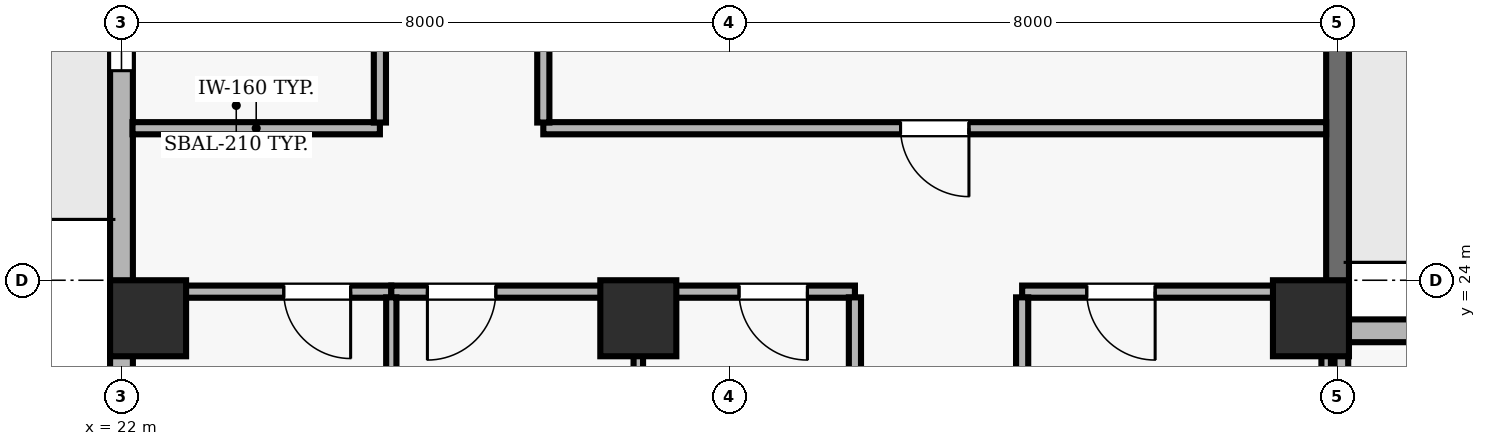
"""IFC4 building model, lengths in metres.
Left out: names, types, materials, properties, quantities, classifications, styles, units other than length and angle.
Written with IfcOpenShell. Run it as: python <this file> out.ifc"""

import sys

from ifc_helpers import new_model, si_unit, direction, frame, frame_2d, origin, origin_2d, place, context, subcontext, project, spatial, rectangle, extrude, element, fill, save


model = new_model("IFC4")
c1 = context("Model", 3, precision=1e-05, world=origin(), true_north=direction((0.0, 1.0)))
c2 = subcontext(c1, "Body", "Model", "MODEL_VIEW")
j1 = project(units=[si_unit("LENGTHUNIT", "METRE"), si_unit("PLANEANGLEUNIT", "RADIAN")], contexts=[c1])
p1 = place(None, origin())
s1 = spatial("IfcSite", under=j1, at=p1, CompositionType="ELEMENT")
p2 = place(p1, origin())
s2 = spatial("IfcBuilding", under=s1, at=p2, CompositionType="ELEMENT")
p3 = place(p2, frame((0.0, 0.0, 203.1)))
s3 = spatial("IfcBuildingStorey", under=s2, at=p3, CompositionType="ELEMENT", Elevation=203.1)
for number, where, z_axis, x_axis in (
    (1, (22.35, 23.5, 0.0), (0.0, 0.0, 1.0), (1.0, 0.0, 0.0)),
    (2, (28.8, 23.5, 0.0), (0.0, 0.0, 1.0), (1.0, 0.0, 0.0)),
    (3, (37.65, 23.5, 0.0), (0.0, 0.0, 1.0), (1.0, 0.0, 0.0)),
):
    element("IfcColumn", number, at=place(p3, frame(where, z_axis=z_axis, x_axis=x_axis)), inside=s3, PredefinedType="COLUMN", context=c2, shape_type="SweptSolid", body=[
        extrude(rectangle(XDim=1.0, YDim=1.0, at=origin_2d()), origin(), (0.0, 0.0, 1.0), 3.9),
    ])
p4 = place(p3, frame((45.9, 23.335, 0.0), z_axis=(0.0, 0.0, 1.0), x_axis=(-1.0, 0.0, 0.0)))
e4 = element("IfcWall", 4, at=p4, inside=s3, PredefinedType="SOLIDWALL", context=c2, shape_type="SweptSolid", body=[
    extrude(rectangle(XDim=7.9, YDim=0.3, at=frame_2d((3.95, 0.0))), origin(), (0.0, 0.0, 1.0), 3.69),
])
p5 = place(p4, frame((2.55, 0.0, 0.9)))
e5 = element("IfcOpeningElement", 5, at=p5, cuts=e4, PredefinedType="OPENING", context=c2, shape_type="SweptSolid", body=[
    extrude(rectangle(XDim=2.8, YDim=1.8, at=frame_2d((1.4, 0.9))), frame((0.0, 0.16, 0.0), z_axis=(0.0, -1.0, 0.0), x_axis=(1.0, 0.0, 0.0)), (0.0, 0.0, 1.0), 0.32),
])
p6 = place(p3, frame((38.0, 23.335, 0.0), z_axis=(0.0, 0.0, 1.0), x_axis=(0.0, 1.0, 0.0)))
e6 = element("IfcWall", 6, at=p6, inside=s3, PredefinedType="SOLIDWALL", context=c2, shape_type="SweptSolid", body=[
    extrude(rectangle(XDim=17.365, YDim=0.3, at=frame_2d((8.683, 0.0))), origin(), (0.0, 0.0, 1.0), 3.69),
])
p7 = place(p6, frame((8.282, 0.0, 0.0)))
e7 = element("IfcOpeningElement", 7, at=p7, cuts=e6, PredefinedType="OPENING", context=c2, shape_type="SweptSolid", body=[
    extrude(rectangle(XDim=1.0, YDim=2.2, at=frame_2d((0.5, 1.1))), frame((0.0, 0.16, 0.0), z_axis=(0.0, -1.0, 0.0), x_axis=(1.0, 0.0, 0.0)), (0.0, 0.0, 1.0), 0.32),
])
p8 = place(p6, frame((13.571, 0.0, 0.9)))
e8 = element("IfcOpeningElement", 8, at=p8, cuts=e6, PredefinedType="OPENING", context=c2, shape_type="SweptSolid", body=[
    extrude(rectangle(XDim=1.8, YDim=2.2, at=frame_2d((0.9, 1.1))), frame((0.0, 0.16, 0.0), z_axis=(0.0, -1.0, 0.0), x_axis=(1.0, 0.0, 0.0)), (0.0, 0.0, 1.0), 0.32),
])
p9 = place(p3, frame((22.0, 40.7, 0.0), z_axis=(0.0, 0.0, 1.0), x_axis=(0.0, -1.0, 0.0)))
e9 = element("IfcWall", 9, at=p9, inside=s3, PredefinedType="SOLIDWALL", context=c2, shape_type="SweptSolid", body=[
    extrude(rectangle(XDim=38.2, YDim=0.3, at=frame_2d((19.1, 0.0))), origin(), (0.0, 0.0, 1.0), 3.69),
])
p10 = place(p9, frame((7.8, 0.0, 0.0)))
e10 = element("IfcOpeningElement", 10, at=p10, cuts=e9, PredefinedType="OPENING", context=c2, shape_type="SweptSolid", body=[
    extrude(rectangle(XDim=1.0, YDim=2.2, at=frame_2d((0.5, 1.1))), frame((0.0, 0.16, 0.0), z_axis=(0.0, -1.0, 0.0), x_axis=(1.0, 0.0, 0.0)), (0.0, 0.0, 1.0), 0.32),
])
p11 = place(p9, frame((1.979, 0.0, 0.9)))
e11 = element("IfcOpeningElement", 11, at=p11, cuts=e9, PredefinedType="OPENING", context=c2, shape_type="SweptSolid", body=[
    extrude(rectangle(XDim=1.5, YDim=1.6, at=frame_2d((0.75, 0.8))), frame((0.0, 0.16, 0.0), z_axis=(0.0, -1.0, 0.0), x_axis=(1.0, 0.0, 0.0)), (0.0, 0.0, 1.0), 0.32),
])
p12 = place(p9, frame((12.443, 0.0, 0.9)))
e12 = element("IfcOpeningElement", 12, at=p12, cuts=e9, PredefinedType="OPENING", context=c2, shape_type="SweptSolid", body=[
    extrude(rectangle(XDim=1.5, YDim=1.6, at=frame_2d((0.75, 0.8))), frame((0.0, 0.16, 0.0), z_axis=(0.0, -1.0, 0.0), x_axis=(1.0, 0.0, 0.0)), (0.0, 0.0, 1.0), 0.32),
])
p13 = place(p9, frame((18.35, 0.0, 0.9)))
e13 = element("IfcOpeningElement", 13, at=p13, cuts=e9, PredefinedType="OPENING", context=c2, shape_type="SweptSolid", body=[
    extrude(rectangle(XDim=1.5, YDim=1.6, at=frame_2d((0.75, 0.8))), frame((0.0, 0.16, 0.0), z_axis=(0.0, -1.0, 0.0), x_axis=(1.0, 0.0, 0.0)), (0.0, 0.0, 1.0), 0.32),
])
p14 = place(p9, frame((23.807, 0.0, 0.9)))
e14 = element("IfcOpeningElement", 14, at=p14, cuts=e9, PredefinedType="OPENING", context=c2, shape_type="SweptSolid", body=[
    extrude(rectangle(XDim=1.5, YDim=1.6, at=frame_2d((0.75, 0.8))), frame((0.0, 0.16, 0.0), z_axis=(0.0, -1.0, 0.0), x_axis=(1.0, 0.0, 0.0)), (0.0, 0.0, 1.0), 0.32),
])
p15 = place(p9, frame((29.264, 0.0, 0.9)))
e15 = element("IfcOpeningElement", 15, at=p15, cuts=e9, PredefinedType="OPENING", context=c2, shape_type="SweptSolid", body=[
    extrude(rectangle(XDim=1.5, YDim=1.6, at=frame_2d((0.75, 0.8))), frame((0.0, 0.16, 0.0), z_axis=(0.0, -1.0, 0.0), x_axis=(1.0, 0.0, 0.0)), (0.0, 0.0, 1.0), 0.32),
])
p16 = place(p3, frame((25.4, 26.0, 0.0), z_axis=(0.0, 0.0, 1.0), x_axis=(-1.0, 0.0, 0.0)))
e16 = element("IfcWall", 16, at=p16, inside=s3, PredefinedType="PARTITIONING", context=c2, shape_type="SweptSolid", body=[
    extrude(rectangle(XDim=3.255, YDim=0.16, at=frame_2d((1.627, 0.0))), origin(), (0.0, 0.0, 1.0), 3.69),
])
p17 = place(p3, frame((25.55, 23.85, 0.0), z_axis=(0.0, 0.0, 1.0), x_axis=(-1.0, 0.0, 0.0)))
e17 = element("IfcWall", 17, at=p17, inside=s3, PredefinedType="PARTITIONING", context=c2, shape_type="SweptSolid", body=[
    extrude(rectangle(XDim=3.35, YDim=0.16, at=frame_2d((1.675, 0.0))), origin(), (0.0, 0.0, 1.0), 3.146),
])
p18 = place(p17, frame((0.535, 0.0, 0.0)))
e18 = element("IfcOpeningElement", 18, at=p18, cuts=e17, PredefinedType="OPENING", context=c2, shape_type="SweptSolid", body=[
    extrude(rectangle(XDim=0.88, YDim=2.1, at=frame_2d((0.44, 1.05))), frame((0.0, 0.09, 0.0), z_axis=(0.0, -1.0, 0.0), x_axis=(1.0, 0.0, 0.0)), (0.0, 0.0, 1.0), 0.18),
])
p19 = place(p3, frame((28.8, 23.85, 0.0), z_axis=(0.0, 0.0, 1.0), x_axis=(-1.0, 0.0, 0.0)))
e19 = element("IfcWall", 19, at=p19, inside=s3, PredefinedType="PARTITIONING", context=c2, shape_type="SweptSolid", body=[
    extrude(rectangle(XDim=3.25, YDim=0.16, at=frame_2d((1.625, 0.0))), origin(), (0.0, 0.0, 1.0), 3.146),
])
p20 = place(p19, frame((1.875, 0.0, 0.0)))
e20 = element("IfcOpeningElement", 20, at=p20, cuts=e19, PredefinedType="OPENING", context=c2, shape_type="SweptSolid", body=[
    extrude(rectangle(XDim=0.9, YDim=2.1, at=frame_2d((0.45, 1.05))), frame((0.0, 0.09, 0.0), z_axis=(0.0, -1.0, 0.0), x_axis=(1.0, 0.0, 0.0)), (0.0, 0.0, 1.0), 0.18),
])
p21 = place(p3, frame((31.65, 23.85, 0.0), z_axis=(0.0, 0.0, 1.0), x_axis=(-1.0, 0.0, 0.0)))
e21 = element("IfcWall", 21, at=p21, inside=s3, PredefinedType="PARTITIONING", context=c2, shape_type="SweptSolid", body=[
    extrude(rectangle(XDim=2.85, YDim=0.16, at=frame_2d((1.425, 0.0))), origin(), (0.0, 0.0, 1.0), 3.146),
])
p22 = place(p21, frame((0.625, 0.0, 0.0)))
e22 = element("IfcOpeningElement", 22, at=p22, cuts=e21, PredefinedType="OPENING", context=c2, shape_type="SweptSolid", body=[
    extrude(rectangle(XDim=0.9, YDim=2.1, at=frame_2d((0.45, 1.05))), frame((0.0, 0.09, 0.0), z_axis=(0.0, -1.0, 0.0), x_axis=(1.0, 0.0, 0.0)), (0.0, 0.0, 1.0), 0.18),
])
p23 = place(p3, frame((37.85, 23.85, 0.0), z_axis=(0.0, 0.0, 1.0), x_axis=(-1.0, 0.0, 0.0)))
e23 = element("IfcWall", 23, at=p23, inside=s3, PredefinedType="PARTITIONING", context=c2, shape_type="SweptSolid", body=[
    extrude(rectangle(XDim=4.0, YDim=0.16, at=frame_2d((2.0, 0.0))), origin(), (0.0, 0.0, 1.0), 3.146),
])
p24 = place(p23, frame((2.25, 0.0, 0.0)))
e24 = element("IfcOpeningElement", 24, at=p24, cuts=e23, PredefinedType="OPENING", context=c2, shape_type="SweptSolid", body=[
    extrude(rectangle(XDim=0.9, YDim=2.1, at=frame_2d((0.45, 1.05))), frame((0.0, 0.09, 0.0), z_axis=(0.0, -1.0, 0.0), x_axis=(1.0, 0.0, 0.0)), (0.0, 0.0, 1.0), 0.18),
])
p25 = place(p3, frame((37.85, 26.0, 0.0), z_axis=(0.0, 0.0, 1.0), x_axis=(-1.0, 0.0, 0.0)))
e25 = element("IfcWall", 25, at=p25, inside=s3, PredefinedType="PARTITIONING", context=c2, shape_type="SweptSolid", body=[
    extrude(rectangle(XDim=10.3, YDim=0.16, at=frame_2d((5.15, 0.0))), origin(), (0.0, 0.0, 1.0), 3.69),
])
p26 = place(p25, frame((4.7, 0.0, 0.0)))
e26 = element("IfcOpeningElement", 26, at=p26, cuts=e25, PredefinedType="OPENING", context=c2, shape_type="SweptSolid", body=[
    extrude(rectangle(XDim=0.9, YDim=2.1, at=frame_2d((0.45, 1.05))), frame((0.0, 0.09, 0.0), z_axis=(0.0, -1.0, 0.0), x_axis=(1.0, 0.0, 0.0)), (0.0, 0.0, 1.0), 0.18),
])
p27 = place(p3, frame((25.4, 34.21, 0.0), z_axis=(0.0, 0.0, 1.0), x_axis=(0.0, -1.0, 0.0)))
e27 = element("IfcWall", 27, at=p27, inside=s3, PredefinedType="PARTITIONING", context=c2, shape_type="SweptSolid", body=[
    extrude(rectangle(XDim=8.135, YDim=0.16, at=frame_2d((4.067, 0.0))), origin(), (0.0, 0.0, 1.0), 3.69),
])
p28 = place(p27, frame((3.618, 0.0, 0.0)))
e28 = element("IfcOpeningElement", 28, at=p28, cuts=e27, PredefinedType="OPENING", context=c2, shape_type="SweptSolid", body=[
    extrude(rectangle(XDim=0.9, YDim=2.1, at=frame_2d((0.45, 1.05))), frame((0.0, 0.09, 0.0), z_axis=(0.0, -1.0, 0.0), x_axis=(1.0, 0.0, 0.0)), (0.0, 0.0, 1.0), 0.18),
])
p29 = place(p3, frame((25.55, 19.16, 0.0), z_axis=(0.0, 0.0, 1.0), x_axis=(0.0, 1.0, 0.0)))
e29 = element("IfcWall", 29, at=p29, inside=s3, PredefinedType="PARTITIONING", context=c2, shape_type="SweptSolid", body=[
    extrude(rectangle(XDim=4.615, YDim=0.135, at=frame_2d((2.308, 0.0))), origin(), (0.0, 0.0, 1.0), 3.69),
])
p30 = place(p3, frame((27.55, 26.075, 0.0), z_axis=(0.0, 0.0, 1.0), x_axis=(0.0, 1.0, 0.0)))
e30 = element("IfcWall", 30, at=p30, inside=s3, PredefinedType="PARTITIONING", context=c2, shape_type="SweptSolid", body=[
    extrude(rectangle(XDim=8.1, YDim=0.16, at=frame_2d((4.05, 0.0))), origin(), (0.0, 0.0, 1.0), 3.69),
])
p31 = place(p3, frame((28.8, 23.775, 0.0), z_axis=(0.0, 0.0, 1.0), x_axis=(0.0, -1.0, 0.0)))
e31 = element("IfcWall", 31, at=p31, inside=s3, PredefinedType="PARTITIONING", context=c2, shape_type="SweptSolid", body=[
    extrude(rectangle(XDim=2.267, YDim=0.125, at=frame_2d((1.133, 0.0))), origin(), (0.0, 0.0, 1.0), 3.69),
])
p32 = place(p3, frame((31.65, 23.775, 0.0), z_axis=(0.0, 0.0, 1.0), x_axis=(0.0, -1.0, 0.0)))
e32 = element("IfcWall", 32, at=p32, inside=s3, PredefinedType="PARTITIONING", context=c2, shape_type="SweptSolid", body=[
    extrude(rectangle(XDim=2.267, YDim=0.16, at=frame_2d((1.133, 0.0))), origin(), (0.0, 0.0, 1.0), 3.69),
])
p33 = place(p3, frame((33.85, 20.835, 0.0), z_axis=(0.0, 0.0, 1.0), x_axis=(0.0, 1.0, 0.0)))
e33 = element("IfcWall", 33, at=p33, inside=s3, PredefinedType="PARTITIONING", context=c2, shape_type="SweptSolid", body=[
    extrude(rectangle(XDim=2.94, YDim=0.16, at=frame_2d((1.47, 0.0))), origin(), (0.0, 0.0, 1.0), 3.69),
])
p34 = place(p3, frame((37.85, 20.835, 0.0), z_axis=(0.0, 0.0, 1.0), x_axis=(0.0, 1.0, 0.0)))
e34 = element("IfcWall", 34, at=p34, inside=s3, PredefinedType="PARTITIONING", context=c2, shape_type="SweptSolid", body=[
    extrude(rectangle(XDim=2.5, YDim=0.125, at=frame_2d((1.25, 0.0))), origin(), (0.0, 0.0, 1.0), 3.146),
])
p35 = place(p3, frame((38.05, 23.19, 0.0), z_axis=(0.0, 0.0, 1.0), x_axis=(0.0, -1.0, 0.0)))
e35 = element("IfcWall", 35, at=p35, inside=s3, PredefinedType="PARTITIONING", context=c2, shape_type="SweptSolid", body=[
    extrude(rectangle(XDim=7.115, YDim=0.18, at=frame_2d((3.558, 0.0))), origin(), (0.0, 0.0, 1.0), 3.146),
])
p36 = place(p12, origin())
e36 = element("IfcWindow", 36, at=p36, inside=s3, PartitioningType="SINGLE_PANEL", PredefinedType="WINDOW", context=c2, shape_type="SweptSolid", body=[
    extrude(rectangle(XDim=1.5, YDim=1.6, at=frame_2d((0.75, 0.8))), frame((0.0, 0.03, 0.0), z_axis=(0.0, -1.0, 0.0), x_axis=(1.0, 0.0, 0.0)), (0.0, 0.0, 1.0), 0.06),
])
fill(e12, e36)
p37 = place(p24, origin())
e37 = element("IfcDoor", 37, at=p37, inside=s3, OperationType="SINGLE_SWING_LEFT", PredefinedType="DOOR", context=c2, shape_type="SweptSolid", body=[
    extrude(rectangle(XDim=0.9, YDim=2.1, at=frame_2d((0.45, 1.05))), frame((0.0, 0.025, 0.0), z_axis=(0.0, -1.0, 0.0), x_axis=(1.0, 0.0, 0.0)), (0.0, 0.0, 1.0), 0.05),
])
fill(e24, e37)
p38 = place(p22, origin())
e38 = element("IfcDoor", 38, at=p38, inside=s3, OperationType="SINGLE_SWING_LEFT", PredefinedType="DOOR", context=c2, shape_type="SweptSolid", body=[
    extrude(rectangle(XDim=0.9, YDim=2.1, at=frame_2d((0.45, 1.05))), frame((0.0, 0.025, 0.0), z_axis=(0.0, -1.0, 0.0), x_axis=(1.0, 0.0, 0.0)), (0.0, 0.0, 1.0), 0.05),
])
fill(e22, e38)
p39 = place(p18, origin())
e39 = element("IfcDoor", 39, at=p39, inside=s3, OperationType="SINGLE_SWING_LEFT", PredefinedType="DOOR", context=c2, shape_type="SweptSolid", body=[
    extrude(rectangle(XDim=0.88, YDim=2.1, at=frame_2d((0.44, 1.05))), frame((0.0, 0.025, 0.0), z_axis=(0.0, -1.0, 0.0), x_axis=(1.0, 0.0, 0.0)), (0.0, 0.0, 1.0), 0.05),
])
fill(e18, e39)
p40 = place(p20, origin())
e40 = element("IfcDoor", 40, at=p40, inside=s3, OperationType="SINGLE_SWING_RIGHT", PredefinedType="DOOR", context=c2, shape_type="SweptSolid", body=[
    extrude(rectangle(XDim=0.9, YDim=2.1, at=frame_2d((0.45, 1.05))), frame((0.0, 0.025, 0.0), z_axis=(0.0, -1.0, 0.0), x_axis=(1.0, 0.0, 0.0)), (0.0, 0.0, 1.0), 0.05),
])
fill(e20, e40)
p41 = place(p26, origin())
e41 = element("IfcDoor", 41, at=p41, inside=s3, OperationType="SINGLE_SWING_LEFT", PredefinedType="DOOR", context=c2, shape_type="SweptSolid", body=[
    extrude(rectangle(XDim=0.9, YDim=2.1, at=frame_2d((0.45, 1.05))), frame((0.0, 0.025, 0.0), z_axis=(0.0, -1.0, 0.0), x_axis=(1.0, 0.0, 0.0)), (0.0, 0.0, 1.0), 0.05),
])
fill(e26, e41)
save(model, sys.argv[1])
